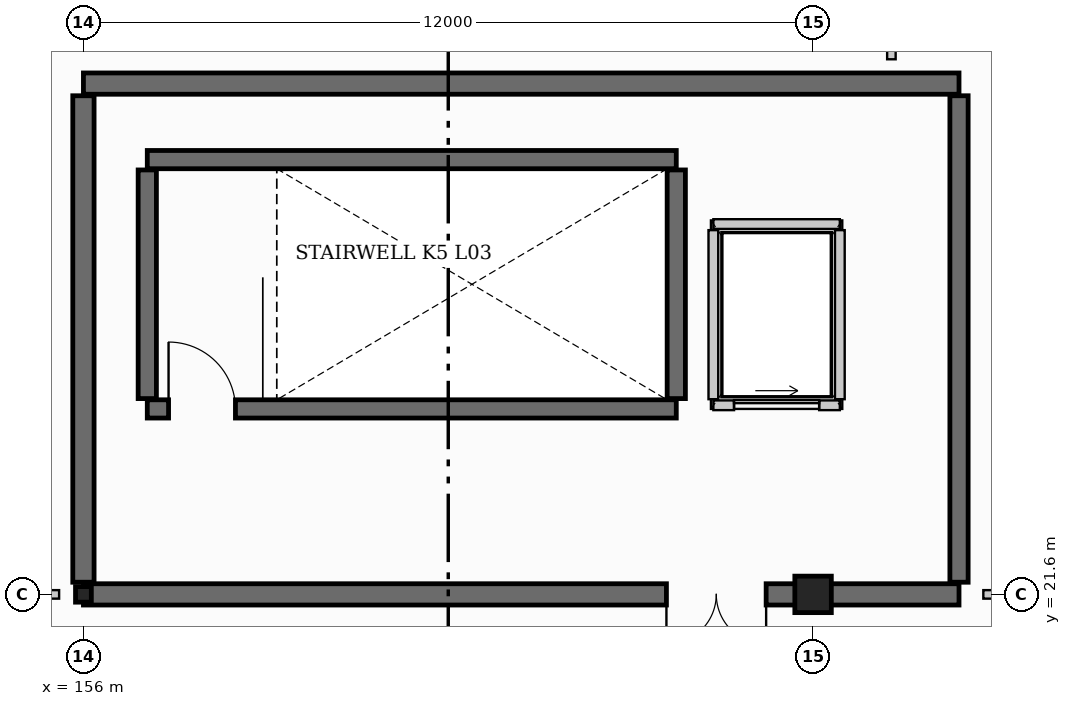
"""IFC4 building model, lengths in metres.
Left out: names, types, materials, properties, quantities, classifications, styles, units other than length and angle.
Written with IfcOpenShell. Run it as: python <this file> out.ifc"""

import sys

from ifc_helpers import new_model, si_unit, direction, frame, frame_2d, origin, origin_2d, place, context, subcontext, project, spatial, rectangle, i_section, extrude, element, fill, save


model = new_model("IFC4")
c1 = context("Model", 3, precision=1e-05, world=origin(), true_north=direction((0.0, 1.0)))
c2 = subcontext(c1, "Body", "Model", "MODEL_VIEW")
j1 = project(units=[si_unit("LENGTHUNIT", "METRE"), si_unit("PLANEANGLEUNIT", "RADIAN")], contexts=[c1])
p1 = place(None, origin())
s1 = spatial("IfcSite", under=j1, at=p1, CompositionType="ELEMENT")
p2 = place(p1, origin())
s2 = spatial("IfcBuilding", under=s1, at=p2, CompositionType="ELEMENT")
p3 = place(p2, frame((0.0, 0.0, 14.4)))
s3 = spatial("IfcBuildingStorey", under=s2, at=p3, CompositionType="ELEMENT", Elevation=14.4)
p4 = place(p3, frame((156.0, 21.6, 0.0), z_axis=(0.0, 0.0, 1.0), x_axis=(0.0, 1.0, 0.0)))
e1 = element("IfcColumn", 1, at=p4, inside=s3, PredefinedType="COLUMN", context=c2, shape_type="SweptSolid", body=[
    extrude(i_section(OverallWidth=0.256, OverallDepth=0.26, WebThickness=0.01, FlangeThickness=0.017, at=origin_2d()), origin(), (0.0, 0.0, 1.0), 3.9),
])
p5 = place(p3, frame((168.0, 21.6, 0.0), z_axis=(0.0, 0.0, 1.0), x_axis=(1.0, 0.0, 0.0)))
e2 = element("IfcColumn", 2, at=p5, inside=s3, PredefinedType="COLUMN", context=c2, shape_type="SweptSolid", body=[
    extrude(rectangle(XDim=0.6, YDim=0.6, at=origin_2d()), origin(), (0.0, 0.0, 1.0), 3.9),
])
p6 = place(p3, frame((156.0, 30.0, 0.0), z_axis=(0.0, 0.0, 1.0), x_axis=(1.0, 0.0, 0.0)))
e3 = element("IfcWall", 3, at=p6, inside=s3, PredefinedType="SHEAR", context=c2, shape_type="SweptSolid", body=[
    extrude(rectangle(XDim=14.4, YDim=0.35, at=frame_2d((7.2, 0.0))), origin(), (0.0, 0.0, 1.0), 3.9),
])
p7 = place(p3, frame((170.4, 21.6, 0.0), z_axis=(0.0, 0.0, 1.0), x_axis=(-1.0, 0.0, 0.0)))
e4 = element("IfcWall", 4, at=p7, inside=s3, PredefinedType="SHEAR", context=c2, shape_type="SweptSolid", body=[
    extrude(rectangle(XDim=14.4, YDim=0.35, at=frame_2d((7.2, 0.0))), origin(), (0.0, 0.0, 1.0), 3.9),
])
p8 = place(p7, frame((3.172, 0.0, 0.0)))
e5 = element("IfcOpeningElement", 5, at=p8, cuts=e4, PredefinedType="OPENING", context=c2, shape_type="SweptSolid", body=[
    extrude(rectangle(XDim=1.64, YDim=2.2, at=frame_2d((0.82, 1.1))), frame((0.0, 0.185, 0.0), z_axis=(0.0, -1.0, 0.0), x_axis=(1.0, 0.0, 0.0)), (0.0, 0.0, 1.0), 0.37),
])
p9 = place(p3, frame((156.0, 21.8, 0.0), z_axis=(0.0, 0.0, 1.0), x_axis=(0.0, 1.0, 0.0)))
e6 = element("IfcWall", 6, at=p9, inside=s3, PredefinedType="SHEAR", context=c2, shape_type="SweptSolid", body=[
    extrude(rectangle(XDim=8.0, YDim=0.35, at=frame_2d((4.0, 0.0))), origin(), (0.0, 0.0, 1.0), 3.9),
])
p10 = place(p3, frame((170.4, 29.8, 0.0), z_axis=(0.0, 0.0, 1.0), x_axis=(0.0, -1.0, 0.0)))
e7 = element("IfcWall", 7, at=p10, inside=s3, PredefinedType="SHEAR", context=c2, shape_type="SweptSolid", body=[
    extrude(rectangle(XDim=8.0, YDim=0.3, at=frame_2d((4.0, 0.0))), origin(), (0.0, 0.0, 1.0), 3.9),
])
p11 = place(p3, frame((157.05, 24.65, 0.0), z_axis=(0.0, 0.0, 1.0), x_axis=(1.0, 0.0, 0.0)))
e8 = element("IfcWall", 8, at=p11, inside=s3, PredefinedType="SHEAR", context=c2, shape_type="SweptSolid", body=[
    extrude(rectangle(XDim=8.7, YDim=0.3, at=frame_2d((4.35, 0.0))), origin(), (0.0, 0.0, 1.0), 3.9),
])
p12 = place(p11, frame((0.35, 0.0, 0.0)))
e9 = element("IfcOpeningElement", 9, at=p12, cuts=e8, PredefinedType="OPENING", context=c2, shape_type="SweptSolid", body=[
    extrude(rectangle(XDim=1.1, YDim=2.15, at=frame_2d((0.55, 1.075))), frame((0.0, 0.16, 0.0), z_axis=(0.0, -1.0, 0.0), x_axis=(1.0, 0.0, 0.0)), (0.0, 0.0, 1.0), 0.32),
])
p13 = place(p3, frame((165.75, 28.75, 0.0), z_axis=(0.0, 0.0, 1.0), x_axis=(-1.0, 0.0, 0.0)))
e10 = element("IfcWall", 10, at=p13, inside=s3, PredefinedType="SHEAR", context=c2, shape_type="SweptSolid", body=[
    extrude(rectangle(XDim=8.7, YDim=0.3, at=frame_2d((4.35, 0.0))), origin(), (0.0, 0.0, 1.0), 3.9),
])
for number, where, z_axis, x_axis in (
    (11, (157.05, 24.82, 0.0), (0.0, 0.0, 1.0), (0.0, 1.0, 0.0)),
    (12, (165.75, 24.82, 0.0), (0.0, 0.0, 1.0), (0.0, 1.0, 0.0)),
):
    element("IfcWall", number, at=place(p3, frame(where, z_axis=z_axis, x_axis=x_axis)), inside=s3, PredefinedType="SHEAR", context=c2, shape_type="SweptSolid", body=[
        extrude(rectangle(XDim=3.76, YDim=0.3, at=frame_2d((1.88, 0.0))), origin(), (0.0, 0.0, 1.0), 3.9),
    ])
p14 = place(p3, frame((166.36, 24.71, 0.0), z_axis=(0.0, 0.0, 1.0), x_axis=(1.0, 0.0, 0.0)))
e13 = element("IfcWall", 13, at=p14, inside=s3, PredefinedType="PARTITIONING", context=c2, shape_type="SweptSolid", body=[
    extrude(rectangle(XDim=2.08, YDim=0.16, at=frame_2d((1.04, 0.0))), origin(), (0.0, 0.0, 1.0), 3.56),
])
p15 = place(p14, frame((0.34, 0.0, 0.0)))
e14 = element("IfcOpeningElement", 14, at=p15, cuts=e13, PredefinedType="OPENING", context=c2, shape_type="SweptSolid", body=[
    extrude(rectangle(XDim=1.4, YDim=2.2, at=frame_2d((0.7, 1.1))), frame((0.0, 0.09, 0.0), z_axis=(0.0, -1.0, 0.0), x_axis=(1.0, 0.0, 0.0)), (0.0, 0.0, 1.0), 0.18),
])
p16 = place(p3, frame((168.44, 27.69, 0.0), z_axis=(0.0, 0.0, 1.0), x_axis=(-1.0, 0.0, 0.0)))
e15 = element("IfcWall", 15, at=p16, inside=s3, PredefinedType="PARTITIONING", context=c2, shape_type="SweptSolid", body=[
    extrude(rectangle(XDim=2.08, YDim=0.16, at=frame_2d((1.04, 0.0))), origin(), (0.0, 0.0, 1.0), 3.56),
])
for number, where, z_axis, x_axis in (
    (16, (166.36, 27.59, 0.0), (0.0, 0.0, 1.0), (0.0, -1.0, 0.0)),
    (17, (168.44, 24.81, 0.0), (0.0, 0.0, 1.0), (0.0, 1.0, 0.0)),
):
    element("IfcWall", number, at=place(p3, frame(where, z_axis=z_axis, x_axis=x_axis)), inside=s3, PredefinedType="PARTITIONING", context=c2, shape_type="SweptSolid", body=[
        extrude(rectangle(XDim=2.78, YDim=0.16, at=frame_2d((1.39, 0.0))), origin(), (0.0, 0.0, 1.0), 3.56),
    ])
p17 = place(p3, frame((144.3, 21.6, 0.0), z_axis=(0.0, 0.0, 1.0), x_axis=(1.0, 0.0, 0.0)))
e18 = element("IfcWall", 18, at=p17, inside=s3, PredefinedType="PARTITIONING", context=c2, shape_type="SweptSolid", body=[
    extrude(rectangle(XDim=11.3, YDim=0.14, at=frame_2d((5.65, 0.0))), origin(), (0.0, 0.0, 1.0), 2.985),
])
p18 = place(p17, frame((5.0, 0.0, 0.0)))
e19 = element("IfcOpeningElement", 19, at=p18, cuts=e18, PredefinedType="OPENING", context=c2, shape_type="SweptSolid", body=[
    extrude(rectangle(XDim=1.36, YDim=2.18, at=frame_2d((0.68, 1.09))), frame((0.0, 0.08, 0.0), z_axis=(0.0, -1.0, 0.0), x_axis=(1.0, 0.0, 0.0)), (0.0, 0.0, 1.0), 0.16),
])
p19 = place(p3, frame((169.288, 30.4, 0.0), z_axis=(0.0, 0.0, 1.0), x_axis=(0.0, 1.0, 0.0)))
e20 = element("IfcWall", 20, at=p19, inside=s3, PredefinedType="PARTITIONING", context=c2, shape_type="SweptSolid", body=[
    extrude(rectangle(XDim=14.9, YDim=0.14, at=frame_2d((7.45, 0.0))), origin(), (0.0, 0.0, 1.0), 3.278),
])
p20 = place(p3, frame((170.8, 21.6, 0.0), z_axis=(0.0, 0.0, 1.0), x_axis=(1.0, 0.0, 0.0)))
e21 = element("IfcWall", 21, at=p20, inside=s3, PredefinedType="PARTITIONING", context=c2, shape_type="SweptSolid", body=[
    extrude(rectangle(XDim=8.9, YDim=0.14, at=frame_2d((4.45, 0.0))), origin(), (0.0, 0.0, 1.0), 3.273),
])
p21 = place(p20, frame((3.8, 0.0, 0.0)))
e22 = element("IfcOpeningElement", 22, at=p21, cuts=e21, PredefinedType="OPENING", context=c2, shape_type="SweptSolid", body=[
    extrude(rectangle(XDim=1.26, YDim=2.14, at=frame_2d((0.63, 1.07))), frame((0.0, 0.08, 0.0), z_axis=(0.0, -1.0, 0.0), x_axis=(1.0, 0.0, 0.0)), (0.0, 0.0, 1.0), 0.16),
])
p22 = place(p15, origin())
e23 = element("IfcDoor", 23, at=p22, inside=s3, OperationType="SLIDING_TO_RIGHT", PredefinedType="DOOR", context=c2, shape_type="SweptSolid", body=[
    extrude(rectangle(XDim=1.4, YDim=2.2, at=frame_2d((0.7, 1.1))), frame((0.0, 0.025, 0.0), z_axis=(0.0, -1.0, 0.0), x_axis=(1.0, 0.0, 0.0)), (0.0, 0.0, 1.0), 0.05),
])
fill(e14, e23)
p23 = place(p12, origin())
e24 = element("IfcDoor", 24, at=p23, inside=s3, OperationType="SINGLE_SWING_LEFT", PredefinedType="DOOR", context=c2, shape_type="SweptSolid", body=[
    extrude(rectangle(XDim=1.1, YDim=2.15, at=frame_2d((0.55, 1.075))), frame((0.0, 0.025, 0.0), z_axis=(0.0, -1.0, 0.0), x_axis=(1.0, 0.0, 0.0)), (0.0, 0.0, 1.0), 0.05),
])
fill(e9, e24)
p24 = place(p8, origin())
e25 = element("IfcDoor", 25, at=p24, inside=s3, OperationType="DOUBLE_DOOR_SINGLE_SWING", PredefinedType="DOOR", context=c2, shape_type="SweptSolid", body=[
    extrude(rectangle(XDim=1.64, YDim=2.2, at=frame_2d((0.82, 1.1))), frame((0.0, 0.025, 0.0), z_axis=(0.0, -1.0, 0.0), x_axis=(1.0, 0.0, 0.0)), (0.0, 0.0, 1.0), 0.05),
])
fill(e5, e25)
save(model, sys.argv[1])
